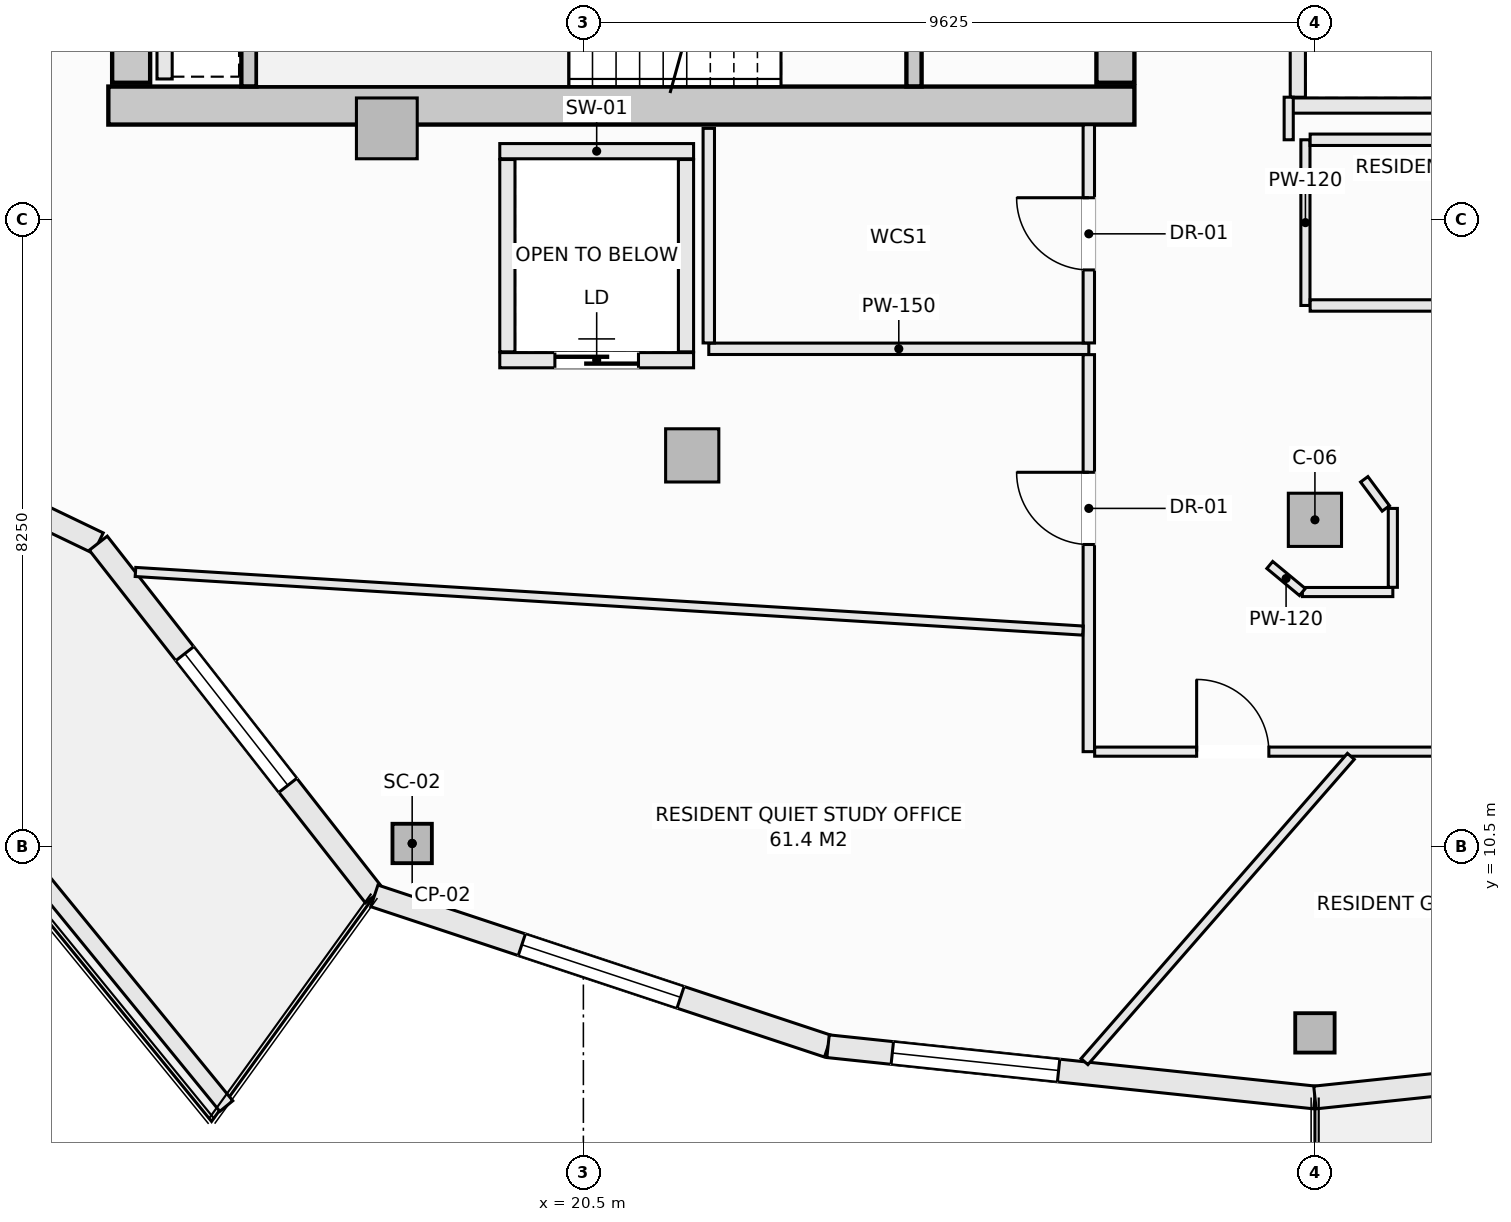
"""IFC4 building model, lengths in metres.
Left out: names, types, materials, properties, quantities, classifications, styles, units other than length and angle.
Written with IfcOpenShell. Run it as: python <this file> out.ifc"""

import sys

from ifc_helpers import new_model, si_unit, direction, frame, frame_2d, origin, origin_2d, place, context, subcontext, project, spatial, rectangle, hollow_rectangle, extrude, element, fill, save


model = new_model("IFC4")
c1 = context("Model", 3, precision=1e-05, world=origin(), true_north=direction((0.0, 1.0)))
c2 = subcontext(c1, "Body", "Model", "MODEL_VIEW")
j1 = project(units=[si_unit("LENGTHUNIT", "METRE"), si_unit("PLANEANGLEUNIT", "RADIAN")], contexts=[c1])
p1 = place(None, origin())
s1 = spatial("IfcSite", under=j1, at=p1, CompositionType="ELEMENT")
p2 = place(p1, origin())
s2 = spatial("IfcBuilding", under=s1, at=p2, CompositionType="ELEMENT")
p3 = place(p2, frame((0.0, 0.0, 236.0)))
s3 = spatial("IfcBuildingStorey", under=s2, at=p3, CompositionType="ELEMENT", Elevation=236.0)
p4 = place(p3, frame((14.25, 20.25, -0.27), z_axis=(0.0, 0.0, 1.0), x_axis=(1.0, 0.0, 0.0)))
e1 = element("IfcWall", 1, at=p4, inside=s3, PredefinedType="SHEAR", context=c2, shape_type="SweptSolid", body=[
    extrude(rectangle(XDim=13.5, YDim=0.5, at=frame_2d((6.75, 0.0))), origin(), (0.0, 0.0, 1.0), 3.3),
])
p5 = place(p3, frame((14.55, 20.55, -0.27), z_axis=(0.0, 0.0, 1.0), x_axis=(0.0, 1.0, 0.0)))
e2 = element("IfcWall", 2, at=p5, inside=s3, PredefinedType="SHEAR", context=c2, shape_type="SweptSolid", body=[
    extrude(rectangle(XDim=12.9, YDim=0.5, at=frame_2d((6.45, 0.0))), origin(), (0.0, 0.0, 1.0), 3.3),
])
p6 = place(p3, frame((27.5, 20.55, -0.27), z_axis=(0.0, 0.0, 1.0), x_axis=(0.0, 1.0, 0.0)))
e3 = element("IfcWall", 3, at=p6, inside=s3, PredefinedType="SHEAR", context=c2, shape_type="SweptSolid", body=[
    extrude(rectangle(XDim=1.5, YDim=0.5, at=frame_2d((0.75, 0.0))), origin(), (0.0, 0.0, 1.0), 3.3),
])
for number, where, z_axis, x_axis in (
    (4, (18.247, 10.542, -0.27), (0.0, 0.0, 1.0), (1.0, 0.0, 0.0)),
    (5, (30.125, 8.05, -0.27), (0.0, 0.0, 1.0), (1.0, 0.0, 0.0)),
):
    element("IfcColumn", number, at=place(p3, frame(where, z_axis=z_axis, x_axis=x_axis)), inside=s3, PredefinedType="COLUMN", context=c2, shape_type="SweptSolid", body=[
        extrude(hollow_rectangle(XDim=0.508, YDim=0.508, WallThickness=0.019, at=origin_2d()), origin(), (0.0, 0.0, 1.0), 3.3),
    ])
for number, where, z_axis, x_axis in (
    (6, (21.932, 15.648, -0.27), (0.0, 0.0, 1.0), (1.0, 0.0, 0.0)),
    (7, (30.125, 14.8, -0.27), (0.0, 0.0, 1.0), (1.0, 0.0, 0.0)),
):
    element("IfcColumn", number, at=place(p3, frame(where, z_axis=z_axis, x_axis=x_axis)), inside=s3, PredefinedType="COLUMN", context=c2, shape_type="SweptSolid", body=[
        extrude(rectangle(XDim=0.7, YDim=0.7, at=origin_2d()), origin(), (0.0, 0.0, 1.0), 3.3),
    ])
p7 = place(p3, frame((17.914, 19.95, -0.27), z_axis=(0.0, 0.0, 1.0), x_axis=(1.0, 0.0, 0.0)))
e8 = element("IfcColumn", 8, at=p7, inside=s3, PredefinedType="PILASTER", context=c2, shape_type="SweptSolid", body=[
    extrude(rectangle(XDim=0.8, YDim=0.8, at=origin_2d()), origin(), (0.0, 0.0, 1.0), 3.3),
])
p8 = place(p3, frame((8.691, 17.1, 0.0), z_axis=(0.0, 0.0, 1.0), x_axis=(0.901348331142, -0.433094892545, 0.0)))
e9 = element("IfcWall", 9, at=p8, inside=s3, PredefinedType="SOLIDWALL", context=c2, shape_type="SweptSolid", body=[
    extrude(rectangle(XDim=6.021, YDim=0.3, at=frame_2d((3.01, 0.0))), origin(), (0.0, 0.0, 1.0), 2.605),
])
p9 = place(p8, frame((2.11, 0.0, 0.0)))
e10 = element("IfcOpeningElement", 10, at=p9, cuts=e9, PredefinedType="OPENING", context=c2, shape_type="SweptSolid", body=[
    extrude(rectangle(XDim=1.8, YDim=2.25, at=frame_2d((0.9, 1.125))), frame((0.0, 0.16, 0.0), z_axis=(0.0, -1.0, 0.0), x_axis=(1.0, 0.0, 0.0)), (0.0, 0.0, 1.0), 0.32),
])
p10 = place(p3, frame((14.117, 14.493, 0.0), z_axis=(0.0, 0.0, 1.0), x_axis=(0.616450126935, -0.787393955401, 0.0)))
e11 = element("IfcWall", 11, at=p10, inside=s3, PredefinedType="SOLIDWALL", context=c2, shape_type="SweptSolid", body=[
    extrude(rectangle(XDim=5.893, YDim=0.3, at=frame_2d((2.946, 0.0))), origin(), (0.0, 0.0, 1.0), 2.605),
])
p11 = place(p10, frame((1.846, 0.0, 0.72)))
e12 = element("IfcOpeningElement", 12, at=p11, cuts=e11, PredefinedType="OPENING", context=c2, shape_type="SweptSolid", body=[
    extrude(rectangle(XDim=2.2, YDim=1.65, at=frame_2d((1.1, 0.825))), frame((0.0, 0.16, 0.0), z_axis=(0.0, -1.0, 0.0), x_axis=(1.0, 0.0, 0.0)), (0.0, 0.0, 1.0), 0.32),
])
p12 = place(p3, frame((17.75, 9.853, 0.0), z_axis=(0.0, 0.0, 1.0), x_axis=(0.949240877604, -0.314550085495, 0.0)))
e13 = element("IfcWall", 13, at=p12, inside=s3, PredefinedType="SOLIDWALL", context=c2, shape_type="SweptSolid", body=[
    extrude(rectangle(XDim=6.288, YDim=0.3, at=frame_2d((3.144, 0.0))), origin(), (0.0, 0.0, 1.0), 2.605),
])
p13 = place(p12, frame((2.044, 0.0, 0.72)))
e14 = element("IfcOpeningElement", 14, at=p13, cuts=e13, PredefinedType="OPENING", context=c2, shape_type="SweptSolid", body=[
    extrude(rectangle(XDim=2.2, YDim=1.65, at=frame_2d((1.1, 0.825))), frame((0.0, 0.16, 0.0), z_axis=(0.0, -1.0, 0.0), x_axis=(1.0, 0.0, 0.0)), (0.0, 0.0, 1.0), 0.32),
])
p14 = place(p3, frame((23.719, 7.875, 0.0), z_axis=(0.0, 0.0, 1.0), x_axis=(0.994497142298, -0.104763705363, 0.0)))
e15 = element("IfcWall", 15, at=p14, inside=s3, PredefinedType="SOLIDWALL", context=c2, shape_type="SweptSolid", body=[
    extrude(rectangle(XDim=6.441, YDim=0.3, at=frame_2d((3.221, 0.0))), origin(), (0.0, 0.0, 1.0), 2.605),
])
p15 = place(p14, frame((0.85, 0.0, 0.72)))
e16 = element("IfcOpeningElement", 16, at=p15, cuts=e15, PredefinedType="OPENING", context=c2, shape_type="SweptSolid", body=[
    extrude(rectangle(XDim=2.2, YDim=1.65, at=frame_2d((1.1, 0.825))), frame((0.0, 0.16, 0.0), z_axis=(0.0, -1.0, 0.0), x_axis=(1.0, 0.0, 0.0)), (0.0, 0.0, 1.0), 0.32),
])
p16 = place(p3, frame((30.125, 7.2, 0.0), z_axis=(0.0, 0.0, 1.0), x_axis=(0.994497142298, 0.104763705363, 0.0)))
e17 = element("IfcWall", 17, at=p16, inside=s3, PredefinedType="SOLIDWALL", context=c2, shape_type="SweptSolid", body=[
    extrude(rectangle(XDim=6.441, YDim=0.3, at=frame_2d((3.221, 0.0))), origin(), (0.0, 0.0, 1.0), 2.605),
])
p17 = place(p16, frame((2.121, 0.0, 0.72)))
e18 = element("IfcOpeningElement", 18, at=p17, cuts=e17, PredefinedType="OPENING", context=c2, shape_type="SweptSolid", body=[
    extrude(rectangle(XDim=2.2, YDim=1.65, at=frame_2d((1.1, 0.825))), frame((0.0, 0.16, 0.0), z_axis=(0.0, -1.0, 0.0), x_axis=(1.0, 0.0, 0.0)), (0.0, 0.0, 1.0), 0.32),
])
p18 = place(p3, frame((11.427, 12.441, 0.0), z_axis=(0.0, 0.0, 1.0), x_axis=(0.632697312147, -0.774399193699, 0.0)))
e19 = element("IfcWall", 19, at=p18, inside=s3, PredefinedType="PARAPET", context=c2, shape_type="SweptSolid", body=[
    extrude(rectangle(XDim=6.914, YDim=0.22, at=frame_2d((3.457, 0.0))), origin(), (0.0, 0.0, 1.0), 0.52),
])
p19 = place(p3, frame((24.85, 20.502, -0.27), z_axis=(0.0, 0.0, 1.0), x_axis=(0.0, 1.0, 0.0)))
e20 = element("IfcWall", 20, at=p19, inside=s3, PredefinedType="SHEAR", context=c2, shape_type="SweptSolid", body=[
    extrude(rectangle(XDim=3.038, YDim=0.2, at=frame_2d((1.519, 0.0))), origin(), (0.0, 0.0, 1.0), 3.3),
])
p20 = place(p19, frame((0.969, 0.0, 0.27)))
e21 = element("IfcOpeningElement", 21, at=p20, cuts=e20, PredefinedType="OPENING", context=c2, shape_type="SweptSolid", body=[
    extrude(rectangle(XDim=1.1, YDim=2.15, at=frame_2d((0.55, 1.075))), frame((0.0, 0.11, 0.0), z_axis=(0.0, -1.0, 0.0), x_axis=(1.0, 0.0, 0.0)), (0.0, 0.0, 1.0), 0.22),
])
p21 = place(p3, frame((16.1, 20.502, -0.27), z_axis=(0.0, 0.0, 1.0), x_axis=(0.0, 1.0, 0.0)))
e22 = element("IfcWall", 22, at=p21, inside=s3, PredefinedType="SHEAR", context=c2, shape_type="SweptSolid", body=[
    extrude(rectangle(XDim=3.036, YDim=0.2, at=frame_2d((1.518, 0.0))), origin(), (0.0, 0.0, 1.0), 3.3),
])
p22 = place(p3, frame((19.4, 19.65, 0.0), z_axis=(0.0, 0.0, 1.0), x_axis=(1.0, 0.0, 0.0)))
e23 = element("IfcWall", 23, at=p22, inside=s3, PredefinedType="SOLIDWALL", context=c2, shape_type="SweptSolid", body=[
    extrude(rectangle(XDim=2.55, YDim=0.2, at=frame_2d((1.275, 0.0))), origin(), (0.0, 0.0, 1.0), 3.03),
])
p23 = place(p3, frame((19.4, 16.9, 0.0), z_axis=(0.0, 0.0, 1.0), x_axis=(1.0, 0.0, 0.0)))
e24 = element("IfcWall", 24, at=p23, inside=s3, PredefinedType="SOLIDWALL", context=c2, shape_type="SweptSolid", body=[
    extrude(rectangle(XDim=2.55, YDim=0.2, at=frame_2d((1.275, 0.0))), origin(), (0.0, 0.0, 1.0), 3.03),
])
p24 = place(p23, frame((0.725, 0.0, 0.0)))
e25 = element("IfcOpeningElement", 25, at=p24, cuts=e24, PredefinedType="OPENING", context=c2, shape_type="SweptSolid", body=[
    extrude(rectangle(XDim=1.1, YDim=2.2, at=frame_2d((0.55, 1.1))), frame((0.0, 0.11, 0.0), z_axis=(0.0, -1.0, 0.0), x_axis=(1.0, 0.0, 0.0)), (0.0, 0.0, 1.0), 0.22),
])
for number, where, z_axis, x_axis in (
    (26, (19.5, 17.01, 0.0), (0.0, 0.0, 1.0), (0.0, 1.0, 0.0)),
    (27, (21.85, 17.01, 0.0), (0.0, 0.0, 1.0), (0.0, 1.0, 0.0)),
):
    element("IfcWall", number, at=place(p3, frame(where, z_axis=z_axis, x_axis=x_axis)), inside=s3, PredefinedType="SOLIDWALL", context=c2, shape_type="SweptSolid", body=[
        extrude(rectangle(XDim=2.53, YDim=0.2, at=frame_2d((1.265, 0.0))), origin(), (0.0, 0.0, 1.0), 3.03),
    ])
p25 = place(p3, frame((29.8, 20.25, 0.0), z_axis=(0.0, 0.0, 1.0), x_axis=(1.0, 0.0, 0.0)))
e28 = element("IfcWall", 28, at=p25, inside=s3, PredefinedType="SOLIDWALL", context=c2, shape_type="SweptSolid", body=[
    extrude(rectangle(XDim=2.45, YDim=0.2, at=frame_2d((1.225, 0.0))), origin(), (0.0, 0.0, 1.0), 3.03),
])
p26 = place(p3, frame((29.9, 20.36, 0.0), z_axis=(0.0, 0.0, 1.0), x_axis=(0.0, 1.0, 0.0)))
e29 = element("IfcWall", 29, at=p26, inside=s3, PredefinedType="SOLIDWALL", context=c2, shape_type="SweptSolid", body=[
    extrude(rectangle(XDim=2.43, YDim=0.2, at=frame_2d((1.215, 0.0))), origin(), (0.0, 0.0, 1.0), 3.03),
])
p27 = place(p3, frame((14.99, 20.6, 0.0), z_axis=(0.0, 0.0, 1.0), x_axis=(0.0, 1.0, 0.0)))
e30 = element("IfcWall", 30, at=p27, inside=s3, PredefinedType="SOLIDWALL", context=c2, shape_type="SweptSolid", body=[
    extrude(rectangle(XDim=2.85, YDim=0.2, at=frame_2d((1.425, 0.0))), origin(), (0.0, 0.0, 1.0), 3.03),
])
p28 = place(p3, frame((22.15, 17.05, 0.0), z_axis=(0.0, 0.0, 1.0), x_axis=(1.0, 0.0, 0.0)))
e31 = element("IfcWall", 31, at=p28, inside=s3, PredefinedType="PARTITIONING", context=c2, shape_type="SweptSolid", body=[
    extrude(rectangle(XDim=5.0, YDim=0.15, at=frame_2d((2.5, 0.0))), origin(), (0.0, 0.0, 1.0), 3.03),
])
p29 = place(p3, frame((22.15, 17.127, 0.0), z_axis=(0.0, 0.0, 1.0), x_axis=(0.0, 1.0, 0.0)))
e32 = element("IfcWall", 32, at=p29, inside=s3, PredefinedType="PARTITIONING", context=c2, shape_type="SweptSolid", body=[
    extrude(rectangle(XDim=2.823, YDim=0.15, at=frame_2d((1.412, 0.0))), origin(), (0.0, 0.0, 1.0), 3.03),
])
p30 = place(p3, frame((27.15, 11.75, 0.0), z_axis=(0.0, 0.0, 1.0), x_axis=(0.0, 1.0, 0.0)))
e33 = element("IfcWall", 33, at=p30, inside=s3, PredefinedType="PARTITIONING", context=c2, shape_type="SweptSolid", body=[
    extrude(rectangle(XDim=5.223, YDim=0.15, at=frame_2d((2.611, 0.0))), origin(), (0.0, 0.0, 1.0), 3.03),
])
p31 = place(p30, frame((2.725, 0.0, 0.0)))
e34 = element("IfcOpeningElement", 34, at=p31, cuts=e33, PredefinedType="OPENING", context=c2, shape_type="SweptSolid", body=[
    extrude(rectangle(XDim=0.95, YDim=2.1, at=frame_2d((0.475, 1.05))), frame((0.0, 0.085, 0.0), z_axis=(0.0, -1.0, 0.0), x_axis=(1.0, 0.0, 0.0)), (0.0, 0.0, 1.0), 0.17),
])
p32 = place(p3, frame((27.15, 17.127, 0.0), z_axis=(0.0, 0.0, 1.0), x_axis=(0.0, 1.0, 0.0)))
e35 = element("IfcWall", 35, at=p32, inside=s3, PredefinedType="PARTITIONING", context=c2, shape_type="SweptSolid", body=[
    extrude(rectangle(XDim=2.871, YDim=0.15, at=frame_2d((1.436, 0.0))), origin(), (0.0, 0.0, 1.0), 3.03),
])
p33 = place(p32, frame((0.96, 0.0, 0.0)))
e36 = element("IfcOpeningElement", 36, at=p33, cuts=e35, PredefinedType="OPENING", context=c2, shape_type="SweptSolid", body=[
    extrude(rectangle(XDim=0.95, YDim=2.1, at=frame_2d((0.475, 1.05))), frame((0.0, 0.085, 0.0), z_axis=(0.0, -1.0, 0.0), x_axis=(1.0, 0.0, 0.0)), (0.0, 0.0, 1.0), 0.17),
])
p34 = place(p3, frame((30.0, 17.62, 0.0), z_axis=(0.0, 0.0, 1.0), x_axis=(0.0, 1.0, 0.0)))
e37 = element("IfcWall", 37, at=p34, inside=s3, PredefinedType="PARTITIONING", context=c2, shape_type="SweptSolid", body=[
    extrude(rectangle(XDim=2.18, YDim=0.12, at=frame_2d((1.09, 0.0))), origin(), (0.0, 0.0, 1.0), 3.03),
])
p35 = place(p3, frame((30.062, 17.62, 0.0), z_axis=(0.0, 0.0, 1.0), x_axis=(1.0, 0.0, 0.0)))
e38 = element("IfcWall", 38, at=p35, inside=s3, PredefinedType="PARTITIONING", context=c2, shape_type="SweptSolid", body=[
    extrude(rectangle(XDim=4.261, YDim=0.15, at=frame_2d((2.13, 0.0))), origin(), (0.0, 0.0, 1.0), 3.03),
])
p36 = place(p35, frame((1.656, 0.0, 0.0)))
e39 = element("IfcOpeningElement", 39, at=p36, cuts=e38, PredefinedType="OPENING", context=c2, shape_type="SweptSolid", body=[
    extrude(rectangle(XDim=0.95, YDim=2.1, at=frame_2d((0.475, 1.05))), frame((0.0, 0.085, 0.0), z_axis=(0.0, -1.0, 0.0), x_axis=(1.0, 0.0, 0.0)), (0.0, 0.0, 1.0), 0.17),
])
p37 = place(p3, frame((30.062, 19.8, 0.0), z_axis=(0.0, 0.0, 1.0), x_axis=(1.0, 0.0, 0.0)))
e40 = element("IfcWall", 40, at=p37, inside=s3, PredefinedType="PARTITIONING", context=c2, shape_type="SweptSolid", body=[
    extrude(rectangle(XDim=4.261, YDim=0.15, at=frame_2d((2.13, 0.0))), origin(), (0.0, 0.0, 1.0), 3.03),
])
p38 = place(p3, frame((29.78, 19.8, 0.0), z_axis=(0.0, 0.0, 1.0), x_axis=(0.0, 1.0, 0.0)))
e41 = element("IfcWall", 41, at=p38, inside=s3, PredefinedType="PARTITIONING", context=c2, shape_type="SweptSolid", body=[
    extrude(rectangle(XDim=0.56, YDim=0.12, at=frame_2d((0.28, 0.0))), origin(), (0.0, 0.0, 1.0), 3.03),
])
p39 = place(p3, frame((27.227, 11.75, 0.0), z_axis=(0.0, 0.0, 1.0), x_axis=(1.0, 0.0, 0.0)))
e42 = element("IfcWall", 42, at=p39, inside=s3, PredefinedType="PARTITIONING", context=c2, shape_type="SweptSolid", body=[
    extrude(rectangle(XDim=8.661, YDim=0.12, at=frame_2d((4.331, 0.0))), origin(), (0.0, 0.0, 1.0), 3.03),
])
p40 = place(p39, frame((1.342, 0.0, 0.0)))
e43 = element("IfcOpeningElement", 43, at=p40, cuts=e42, PredefinedType="OPENING", context=c2, shape_type="SweptSolid", body=[
    extrude(rectangle(XDim=0.95, YDim=2.1, at=frame_2d((0.475, 1.05))), frame((0.0, 0.07, 0.0), z_axis=(0.0, -1.0, 0.0), x_axis=(1.0, 0.0, 0.0)), (0.0, 0.0, 1.0), 0.14),
])
p41 = place(p39, frame((5.324, 0.0, 0.0)))
e44 = element("IfcOpeningElement", 44, at=p41, cuts=e42, PredefinedType="OPENING", context=c2, shape_type="SweptSolid", body=[
    extrude(rectangle(XDim=0.95, YDim=2.1, at=frame_2d((0.475, 1.05))), frame((0.0, 0.07, 0.0), z_axis=(0.0, -1.0, 0.0), x_axis=(1.0, 0.0, 0.0)), (0.0, 0.0, 1.0), 0.14),
])
p42 = place(p3, frame((29.96, 13.85, 0.0), z_axis=(0.0, 0.0, 1.0), x_axis=(1.0, 0.0, 0.0)))
e45 = element("IfcWall", 45, at=p42, inside=s3, PredefinedType="PARTITIONING", context=c2, shape_type="SweptSolid", body=[
    extrude(rectangle(XDim=1.19, YDim=0.12, at=frame_2d((0.595, 0.0))), origin(), (0.0, 0.0, 1.0), 3.03),
])
p43 = place(p3, frame((31.15, 13.912, 0.0), z_axis=(0.0, 0.0, 1.0), x_axis=(0.0, 1.0, 0.0)))
e46 = element("IfcWall", 46, at=p43, inside=s3, PredefinedType="PARTITIONING", context=c2, shape_type="SweptSolid", body=[
    extrude(rectangle(XDim=1.038, YDim=0.12, at=frame_2d((0.519, 0.0))), origin(), (0.0, 0.0, 1.0), 3.03),
])
p44 = place(p3, frame((30.774, 15.333, 0.0), z_axis=(0.0, 0.0, 1.0), x_axis=(0.595814974861, -0.803121731577, 0.0)))
e47 = element("IfcWall", 47, at=p44, inside=s3, PredefinedType="PARTITIONING", context=c2, shape_type="SweptSolid", body=[
    extrude(rectangle(XDim=0.477, YDim=0.12, at=frame_2d((0.239, 0.0))), origin(), (0.0, 0.0, 1.0), 3.03),
])
p45 = place(p3, frame((29.531, 14.206, 0.0), z_axis=(0.0, 0.0, 1.0), x_axis=(0.7695479554, -0.638589026166, 0.0)))
e48 = element("IfcWall", 48, at=p45, inside=s3, PredefinedType="PARTITIONING", context=c2, shape_type="SweptSolid", body=[
    extrude(rectangle(XDim=0.557, YDim=0.12, at=frame_2d((0.279, 0.0))), origin(), (0.0, 0.0, 1.0), 3.03),
])
p46 = place(p3, frame((14.607, 14.114, 0.0), z_axis=(0.0, 0.0, 1.0), x_axis=(0.998091702445, -0.061749117487, 0.0)))
e49 = element("IfcWall", 49, at=p46, inside=s3, PredefinedType="PARTITIONING", context=c2, shape_type="SweptSolid", body=[
    extrude(rectangle(XDim=12.49, YDim=0.12, at=frame_2d((6.245, 0.0))), origin(), (0.0, 0.0, 1.0), 3.03),
])
p47 = place(p3, frame((27.093, 7.672, 0.0), z_axis=(0.0, 0.0, 1.0), x_axis=(0.657573480864, 0.753390414901, 0.0)))
e50 = element("IfcWall", 50, at=p47, inside=s3, PredefinedType="PARTITIONING", context=c2, shape_type="SweptSolid", body=[
    extrude(rectangle(XDim=5.33, YDim=0.12, at=frame_2d((2.665, 0.0))), origin(), (0.0, 0.0, 1.0), 3.03),
])
p48 = place(p11, origin())
e51 = element("IfcWindow", 51, at=p48, inside=s3, PartitioningType="SINGLE_PANEL", PredefinedType="WINDOW", context=c2, shape_type="SweptSolid", body=[
    extrude(rectangle(XDim=2.2, YDim=1.65, at=frame_2d((1.1, 0.825))), frame((0.0, 0.03, 0.0), z_axis=(0.0, -1.0, 0.0), x_axis=(1.0, 0.0, 0.0)), (0.0, 0.0, 1.0), 0.06),
])
fill(e12, e51)
p49 = place(p13, origin())
e52 = element("IfcWindow", 52, at=p49, inside=s3, PartitioningType="SINGLE_PANEL", PredefinedType="WINDOW", context=c2, shape_type="SweptSolid", body=[
    extrude(rectangle(XDim=2.2, YDim=1.65, at=frame_2d((1.1, 0.825))), frame((0.0, 0.03, 0.0), z_axis=(0.0, -1.0, 0.0), x_axis=(1.0, 0.0, 0.0)), (0.0, 0.0, 1.0), 0.06),
])
fill(e14, e52)
p50 = place(p15, origin())
e53 = element("IfcWindow", 53, at=p50, inside=s3, PartitioningType="SINGLE_PANEL", PredefinedType="WINDOW", context=c2, shape_type="SweptSolid", body=[
    extrude(rectangle(XDim=2.2, YDim=1.65, at=frame_2d((1.1, 0.825))), frame((0.0, 0.03, 0.0), z_axis=(0.0, -1.0, 0.0), x_axis=(1.0, 0.0, 0.0)), (0.0, 0.0, 1.0), 0.06),
])
fill(e16, e53)
p51 = place(p24, origin())
e54 = element("IfcDoor", 54, at=p51, inside=s3, OperationType="SLIDING_TO_LEFT", PredefinedType="DOOR", context=c2, shape_type="SweptSolid", body=[
    extrude(rectangle(XDim=1.1, YDim=2.2, at=frame_2d((0.55, 1.1))), frame((0.0, 0.025, 0.0), z_axis=(0.0, -1.0, 0.0), x_axis=(1.0, 0.0, 0.0)), (0.0, 0.0, 1.0), 0.05),
])
fill(e25, e54)
p52 = place(p33, origin())
e55 = element("IfcDoor", 55, at=p52, inside=s3, OperationType="SINGLE_SWING_RIGHT", PredefinedType="DOOR", context=c2, shape_type="SweptSolid", body=[
    extrude(rectangle(XDim=0.95, YDim=2.1, at=frame_2d((0.475, 1.05))), frame((0.0, 0.025, 0.0), z_axis=(0.0, -1.0, 0.0), x_axis=(1.0, 0.0, 0.0)), (0.0, 0.0, 1.0), 0.05),
])
fill(e36, e55)
p53 = place(p31, origin())
e56 = element("IfcDoor", 56, at=p53, inside=s3, OperationType="SINGLE_SWING_RIGHT", PredefinedType="DOOR", context=c2, shape_type="SweptSolid", body=[
    extrude(rectangle(XDim=0.95, YDim=2.1, at=frame_2d((0.475, 1.05))), frame((0.0, 0.025, 0.0), z_axis=(0.0, -1.0, 0.0), x_axis=(1.0, 0.0, 0.0)), (0.0, 0.0, 1.0), 0.05),
])
fill(e34, e56)
p54 = place(p40, origin())
e57 = element("IfcDoor", 57, at=p54, inside=s3, OperationType="SINGLE_SWING_LEFT", PredefinedType="DOOR", context=c2, shape_type="SweptSolid", body=[
    extrude(rectangle(XDim=0.95, YDim=2.1, at=frame_2d((0.475, 1.05))), frame((0.0, 0.025, 0.0), z_axis=(0.0, -1.0, 0.0), x_axis=(1.0, 0.0, 0.0)), (0.0, 0.0, 1.0), 0.05),
])
fill(e43, e57)
save(model, sys.argv[1])
